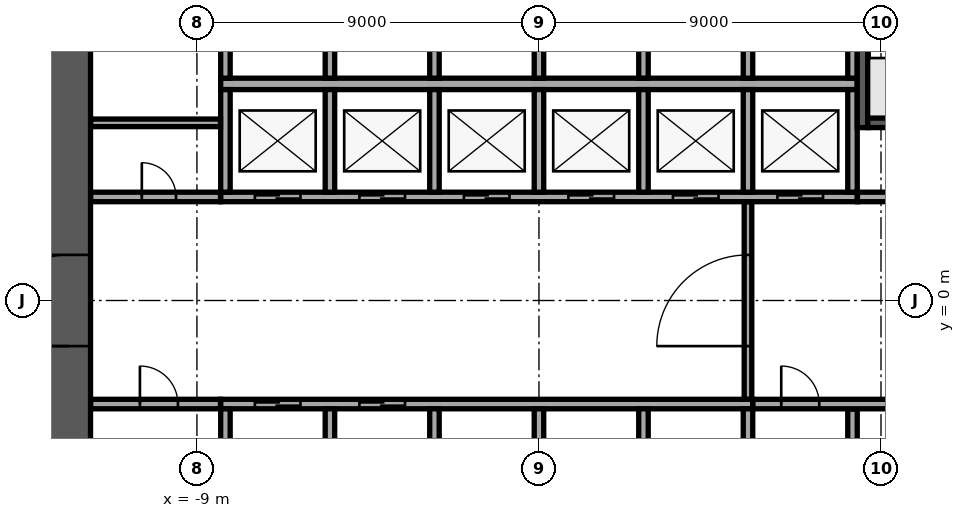
"""IFC4 building model, lengths in metres.
Left out: names, types, materials, properties, quantities, classifications, styles, units other than length and angle.
Written with IfcOpenShell. Run it as: python <this file> out.ifc"""

import sys

from ifc_helpers import new_model, si_unit, direction, frame, frame_2d, origin, place, context, subcontext, project, spatial, rectangle, extrude, element, fill, save


model = new_model("IFC4")
c1 = context("Model", 3, precision=1e-05, world=origin(), true_north=direction((0.0, 1.0)))
c2 = subcontext(c1, "Body", "Model", "MODEL_VIEW")
j1 = project(units=[si_unit("LENGTHUNIT", "METRE"), si_unit("PLANEANGLEUNIT", "RADIAN")], contexts=[c1])
p1 = place(None, origin())
s1 = spatial("IfcSite", under=j1, at=p1, CompositionType="ELEMENT")
p2 = place(p1, origin())
s2 = spatial("IfcBuilding", under=s1, at=p2, CompositionType="ELEMENT")
p3 = place(p2, frame((0.0, 0.0, 130.1)))
s3 = spatial("IfcBuildingStorey", under=s2, at=p3, CompositionType="ELEMENT", Elevation=130.1)
p4 = place(p3, frame((-12.35, -11.8, 0.0), z_axis=(0.0, 0.0, 1.0), x_axis=(0.0, 1.0, 0.0)))
e1 = element("IfcWall", 1, at=p4, inside=s3, PredefinedType="SHEAR", context=c2, shape_type="SweptSolid", body=[
    extrude(rectangle(XDim=23.6, YDim=1.1, at=frame_2d((11.8, 0.0))), origin(), (0.0, 0.0, 1.0), 5.2),
])
p5 = place(p4, frame((10.6, 0.0, 0.0)))
e2 = element("IfcOpeningElement", 2, at=p5, cuts=e1, PredefinedType="OPENING", context=c2, shape_type="SweptSolid", body=[
    extrude(rectangle(XDim=2.4, YDim=2.4, at=frame_2d((1.2, 1.2))), frame((0.0, 0.56, 0.0), z_axis=(0.0, -1.0, 0.0), x_axis=(1.0, 0.0, 0.0)), (0.0, 0.0, 1.0), 1.12),
])
p6 = place(p3, frame((-8.375, 5.7, 0.0), z_axis=(0.0, 0.0, 1.0), x_axis=(1.0, 0.0, 0.0)))
e3 = element("IfcWall", 3, at=p6, inside=s3, PredefinedType="SOLIDWALL", context=c2, shape_type="SweptSolid", body=[
    extrude(rectangle(XDim=16.75, YDim=0.3, at=frame_2d((8.375, 0.0))), origin(), (0.0, 0.0, 1.0), 5.2),
])
p7 = place(p3, frame((-8.375, 2.725, 0.0), z_axis=(0.0, 0.0, 1.0), x_axis=(1.0, 0.0, 0.0)))
e4 = element("IfcWall", 4, at=p7, inside=s3, PredefinedType="SOLIDWALL", context=c2, shape_type="SweptSolid", body=[
    extrude(rectangle(XDim=16.75, YDim=0.25, at=frame_2d((8.375, 0.0))), origin(), (0.0, 0.0, 1.0), 5.2),
])
p8 = place(p7, frame((0.9, 0.0, 0.0)))
e5 = element("IfcOpeningElement", 5, at=p8, cuts=e4, PredefinedType="OPENING", context=c2, shape_type="SweptSolid", body=[
    extrude(rectangle(XDim=1.2, YDim=2.1, at=frame_2d((0.6, 1.05))), frame((0.0, 0.135, 0.0), z_axis=(0.0, -1.0, 0.0), x_axis=(1.0, 0.0, 0.0)), (0.0, 0.0, 1.0), 0.27),
])
p9 = place(p7, frame((3.65, 0.0, 0.0)))
e6 = element("IfcOpeningElement", 6, at=p9, cuts=e4, PredefinedType="OPENING", context=c2, shape_type="SweptSolid", body=[
    extrude(rectangle(XDim=1.2, YDim=2.1, at=frame_2d((0.6, 1.05))), frame((0.0, 0.135, 0.0), z_axis=(0.0, -1.0, 0.0), x_axis=(1.0, 0.0, 0.0)), (0.0, 0.0, 1.0), 0.27),
])
p10 = place(p7, frame((6.4, 0.0, 0.0)))
e7 = element("IfcOpeningElement", 7, at=p10, cuts=e4, PredefinedType="OPENING", context=c2, shape_type="SweptSolid", body=[
    extrude(rectangle(XDim=1.2, YDim=2.1, at=frame_2d((0.6, 1.05))), frame((0.0, 0.135, 0.0), z_axis=(0.0, -1.0, 0.0), x_axis=(1.0, 0.0, 0.0)), (0.0, 0.0, 1.0), 0.27),
])
p11 = place(p7, frame((9.15, 0.0, 0.0)))
e8 = element("IfcOpeningElement", 8, at=p11, cuts=e4, PredefinedType="OPENING", context=c2, shape_type="SweptSolid", body=[
    extrude(rectangle(XDim=1.2, YDim=2.1, at=frame_2d((0.6, 1.05))), frame((0.0, 0.135, 0.0), z_axis=(0.0, -1.0, 0.0), x_axis=(1.0, 0.0, 0.0)), (0.0, 0.0, 1.0), 0.27),
])
p12 = place(p7, frame((11.9, 0.0, 0.0)))
e9 = element("IfcOpeningElement", 9, at=p12, cuts=e4, PredefinedType="OPENING", context=c2, shape_type="SweptSolid", body=[
    extrude(rectangle(XDim=1.2, YDim=2.1, at=frame_2d((0.6, 1.05))), frame((0.0, 0.135, 0.0), z_axis=(0.0, -1.0, 0.0), x_axis=(1.0, 0.0, 0.0)), (0.0, 0.0, 1.0), 0.27),
])
p13 = place(p7, frame((14.65, 0.0, 0.0)))
e10 = element("IfcOpeningElement", 10, at=p13, cuts=e4, PredefinedType="OPENING", context=c2, shape_type="SweptSolid", body=[
    extrude(rectangle(XDim=1.2, YDim=2.1, at=frame_2d((0.6, 1.05))), frame((0.0, 0.135, 0.0), z_axis=(0.0, -1.0, 0.0), x_axis=(1.0, 0.0, 0.0)), (0.0, 0.0, 1.0), 0.27),
])
for number, where, z_axis, x_axis in (
    (11, (-8.25, 2.85, 0.0), (0.0, 0.0, 1.0), (0.0, 1.0, 0.0)),
    (12, (-5.5, 2.85, 0.0), (0.0, 0.0, 1.0), (0.0, 1.0, 0.0)),
    (13, (-2.75, 2.85, 0.0), (0.0, 0.0, 1.0), (0.0, 1.0, 0.0)),
    (14, (0.0, 2.85, 0.0), (0.0, 0.0, 1.0), (0.0, 1.0, 0.0)),
    (15, (2.75, 2.85, 0.0), (0.0, 0.0, 1.0), (0.0, 1.0, 0.0)),
    (16, (5.5, 2.85, 0.0), (0.0, 0.0, 1.0), (0.0, 1.0, 0.0)),
    (17, (8.25, 2.85, 0.0), (0.0, 0.0, 1.0), (0.0, 1.0, 0.0)),
    (18, (-8.25, 5.85, 0.0), (0.0, 0.0, 1.0), (0.0, 1.0, 0.0)),
    (19, (-5.5, 5.85, 0.0), (0.0, 0.0, 1.0), (0.0, 1.0, 0.0)),
    (20, (-2.75, 5.85, 0.0), (0.0, 0.0, 1.0), (0.0, 1.0, 0.0)),
    (21, (0.0, 5.85, 0.0), (0.0, 0.0, 1.0), (0.0, 1.0, 0.0)),
    (22, (2.75, 5.85, 0.0), (0.0, 0.0, 1.0), (0.0, 1.0, 0.0)),
    (23, (5.5, 5.85, 0.0), (0.0, 0.0, 1.0), (0.0, 1.0, 0.0)),
    (24, (8.25, 5.85, 0.0), (0.0, 0.0, 1.0), (0.0, 1.0, 0.0)),
):
    element("IfcWall", number, at=place(p3, frame(where, z_axis=z_axis, x_axis=x_axis)), inside=s3, PredefinedType="SOLIDWALL", context=c2, shape_type="SweptSolid", body=[
        extrude(rectangle(XDim=2.7, YDim=0.25, at=frame_2d((1.35, 0.0))), origin(), (0.0, 0.0, 1.0), 5.2),
    ])
p14 = place(p3, frame((-8.375, -2.725, 0.0), z_axis=(0.0, 0.0, 1.0), x_axis=(1.0, 0.0, 0.0)))
e25 = element("IfcWall", 25, at=p14, inside=s3, PredefinedType="SOLIDWALL", context=c2, shape_type="SweptSolid", body=[
    extrude(rectangle(XDim=14.0, YDim=0.25, at=frame_2d((7.0, 0.0))), origin(), (0.0, 0.0, 1.0), 5.2),
])
p15 = place(p14, frame((0.9, 0.0, 0.0)))
e26 = element("IfcOpeningElement", 26, at=p15, cuts=e25, PredefinedType="OPENING", context=c2, shape_type="SweptSolid", body=[
    extrude(rectangle(XDim=1.2, YDim=2.1, at=frame_2d((0.6, 1.05))), frame((0.0, 0.135, 0.0), z_axis=(0.0, -1.0, 0.0), x_axis=(1.0, 0.0, 0.0)), (0.0, 0.0, 1.0), 0.27),
])
p16 = place(p14, frame((3.65, 0.0, 0.0)))
e27 = element("IfcOpeningElement", 27, at=p16, cuts=e25, PredefinedType="OPENING", context=c2, shape_type="SweptSolid", body=[
    extrude(rectangle(XDim=1.2, YDim=2.1, at=frame_2d((0.6, 1.05))), frame((0.0, 0.135, 0.0), z_axis=(0.0, -1.0, 0.0), x_axis=(1.0, 0.0, 0.0)), (0.0, 0.0, 1.0), 0.27),
])
for number, where, z_axis, x_axis in (
    (28, (-8.25, -5.55, 0.0), (0.0, 0.0, 1.0), (0.0, 1.0, 0.0)),
    (29, (-5.5, -5.55, 0.0), (0.0, 0.0, 1.0), (0.0, 1.0, 0.0)),
    (30, (-2.75, -5.55, 0.0), (0.0, 0.0, 1.0), (0.0, 1.0, 0.0)),
    (31, (0.0, -5.55, 0.0), (0.0, 0.0, 1.0), (0.0, 1.0, 0.0)),
    (32, (2.75, -5.55, 0.0), (0.0, 0.0, 1.0), (0.0, 1.0, 0.0)),
    (33, (5.5, -5.55, 0.0), (0.0, 0.0, 1.0), (0.0, 1.0, 0.0)),
):
    element("IfcWall", number, at=place(p3, frame(where, z_axis=z_axis, x_axis=x_axis)), inside=s3, PredefinedType="SOLIDWALL", context=c2, shape_type="SweptSolid", body=[
        extrude(rectangle(XDim=2.7, YDim=0.25, at=frame_2d((1.35, 0.0))), origin(), (0.0, 0.0, 1.0), 5.2),
    ])
p17 = place(p3, frame((8.512, 4.55, 0.0), z_axis=(0.0, 0.0, 1.0), x_axis=(0.0, 1.0, 0.0)))
e34 = element("IfcWall", 34, at=p17, inside=s3, PredefinedType="SOLIDWALL", context=c2, shape_type="SweptSolid", body=[
    extrude(rectangle(XDim=7.25, YDim=0.275, at=frame_2d((3.625, 0.0))), origin(), (0.0, 0.0, 1.0), 5.2),
])
p18 = place(p17, frame((6.0, 0.0, 0.0)))
e35 = element("IfcOpeningElement", 35, at=p18, cuts=e34, PredefinedType="OPENING", context=c2, shape_type="SweptSolid", body=[
    extrude(rectangle(XDim=1.0, YDim=2.1, at=frame_2d((0.5, 1.05))), frame((0.0, 0.147, 0.0), z_axis=(0.0, -1.0, 0.0), x_axis=(1.0, 0.0, 0.0)), (0.0, 0.0, 1.0), 0.295),
])
p19 = place(p3, frame((8.65, 4.675, 0.0), z_axis=(0.0, 0.0, 1.0), x_axis=(1.0, 0.0, 0.0)))
e36 = element("IfcWall", 36, at=p19, inside=s3, PredefinedType="SOLIDWALL", context=c2, shape_type="SweptSolid", body=[
    extrude(rectangle(XDim=3.15, YDim=0.25, at=frame_2d((1.575, 0.0))), origin(), (0.0, 0.0, 1.0), 5.2),
])
p20 = place(p3, frame((8.25, -5.545, 0.0), z_axis=(0.0, 0.0, 1.0), x_axis=(0.0, 1.0, 0.0)))
e37 = element("IfcWall", 37, at=p20, inside=s3, PredefinedType="PARTITIONING", context=c2, shape_type="SweptSolid", body=[
    extrude(rectangle(XDim=2.69, YDim=0.25, at=frame_2d((1.345, 0.0))), origin(), (0.0, 0.0, 1.0), 5.2),
])
p21 = place(p3, frame((-11.795, -2.725, 0.0), z_axis=(0.0, 0.0, 1.0), x_axis=(1.0, 0.0, 0.0)))
e38 = element("IfcWall", 38, at=p21, inside=s3, PredefinedType="PARTITIONING", context=c2, shape_type="SweptSolid", body=[
    extrude(rectangle(XDim=3.415, YDim=0.25, at=frame_2d((1.708, 0.0))), origin(), (0.0, 0.0, 1.0), 5.2),
])
p22 = place(p21, frame((1.295, 0.0, 0.0)))
e39 = element("IfcOpeningElement", 39, at=p22, cuts=e38, PredefinedType="OPENING", context=c2, shape_type="SweptSolid", body=[
    extrude(rectangle(XDim=1.0, YDim=2.1, at=frame_2d((0.5, 1.05))), frame((0.0, 0.135, 0.0), z_axis=(0.0, -1.0, 0.0), x_axis=(1.0, 0.0, 0.0)), (0.0, 0.0, 1.0), 0.27),
])
p23 = place(p3, frame((5.63, -2.725, 0.0), z_axis=(0.0, 0.0, 1.0), x_axis=(1.0, 0.0, 0.0)))
e40 = element("IfcWall", 40, at=p23, inside=s3, PredefinedType="PARTITIONING", context=c2, shape_type="SweptSolid", body=[
    extrude(rectangle(XDim=6.165, YDim=0.25, at=frame_2d((3.083, 0.0))), origin(), (0.0, 0.0, 1.0), 5.2),
])
p24 = place(p23, frame((0.745, 0.0, 0.0)))
e41 = element("IfcOpeningElement", 41, at=p24, cuts=e40, PredefinedType="OPENING", context=c2, shape_type="SweptSolid", body=[
    extrude(rectangle(XDim=1.0, YDim=2.1, at=frame_2d((0.5, 1.05))), frame((0.0, 0.135, 0.0), z_axis=(0.0, -1.0, 0.0), x_axis=(1.0, 0.0, 0.0)), (0.0, 0.0, 1.0), 0.27),
])
p25 = place(p23, frame((3.92, 0.0, 0.0)))
e42 = element("IfcOpeningElement", 42, at=p25, cuts=e40, PredefinedType="OPENING", context=c2, shape_type="SweptSolid", body=[
    extrude(rectangle(XDim=0.9, YDim=2.1, at=frame_2d((0.45, 1.05))), frame((0.0, 0.135, 0.0), z_axis=(0.0, -1.0, 0.0), x_axis=(1.0, 0.0, 0.0)), (0.0, 0.0, 1.0), 0.27),
])
p26 = place(p3, frame((5.5, -2.595, 0.0), z_axis=(0.0, 0.0, 1.0), x_axis=(0.0, 1.0, 0.0)))
e43 = element("IfcWall", 43, at=p26, inside=s3, PredefinedType="PARTITIONING", context=c2, shape_type="SweptSolid", body=[
    extrude(rectangle(XDim=5.19, YDim=0.2, at=frame_2d((2.595, 0.0))), origin(), (0.0, 0.0, 1.0), 5.2),
])
p27 = place(p26, frame((1.395, 0.0, 0.0)))
e44 = element("IfcOpeningElement", 44, at=p27, cuts=e43, PredefinedType="OPENING", context=c2, shape_type="SweptSolid", body=[
    extrude(rectangle(XDim=2.4, YDim=2.4, at=frame_2d((1.2, 1.2))), frame((0.0, 0.11, 0.0), z_axis=(0.0, -1.0, 0.0), x_axis=(1.0, 0.0, 0.0)), (0.0, 0.0, 1.0), 0.22),
])
p28 = place(p3, frame((-11.795, 2.725, 0.0), z_axis=(0.0, 0.0, 1.0), x_axis=(1.0, 0.0, 0.0)))
e45 = element("IfcWall", 45, at=p28, inside=s3, PredefinedType="PARTITIONING", context=c2, shape_type="SweptSolid", body=[
    extrude(rectangle(XDim=3.415, YDim=0.25, at=frame_2d((1.708, 0.0))), origin(), (0.0, 0.0, 1.0), 5.2),
])
p29 = place(p28, frame((1.345, 0.0, 0.0)))
e46 = element("IfcOpeningElement", 46, at=p29, cuts=e45, PredefinedType="OPENING", context=c2, shape_type="SweptSolid", body=[
    extrude(rectangle(XDim=0.9, YDim=2.1, at=frame_2d((0.45, 1.05))), frame((0.0, 0.135, 0.0), z_axis=(0.0, -1.0, 0.0), x_axis=(1.0, 0.0, 0.0)), (0.0, 0.0, 1.0), 0.27),
])
p30 = place(p3, frame((8.38, 2.725, 0.0), z_axis=(0.0, 0.0, 1.0), x_axis=(1.0, 0.0, 0.0)))
e47 = element("IfcWall", 47, at=p30, inside=s3, PredefinedType="PARTITIONING", context=c2, shape_type="SweptSolid", body=[
    extrude(rectangle(XDim=3.415, YDim=0.25, at=frame_2d((1.708, 0.0))), origin(), (0.0, 0.0, 1.0), 5.2),
])
p31 = place(p30, frame((1.17, 0.0, 0.0)))
e48 = element("IfcOpeningElement", 48, at=p31, cuts=e47, PredefinedType="OPENING", context=c2, shape_type="SweptSolid", body=[
    extrude(rectangle(XDim=0.9, YDim=2.1, at=frame_2d((0.45, 1.05))), frame((0.0, 0.135, 0.0), z_axis=(0.0, -1.0, 0.0), x_axis=(1.0, 0.0, 0.0)), (0.0, 0.0, 1.0), 0.27),
])
p32 = place(p3, frame((-11.795, 4.675, 0.0), z_axis=(0.0, 0.0, 1.0), x_axis=(1.0, 0.0, 0.0)))
e49 = element("IfcWall", 49, at=p32, inside=s3, PredefinedType="PARTITIONING", context=c2, shape_type="SweptSolid", body=[
    extrude(rectangle(XDim=3.415, YDim=0.2, at=frame_2d((1.708, 0.0))), origin(), (0.0, 0.0, 1.0), 5.2),
])
p33 = place(p5, origin())
e50 = element("IfcDoor", 50, at=p33, inside=s3, OperationType="SINGLE_SWING_LEFT", PredefinedType="DOOR", context=c2, shape_type="SweptSolid", body=[
    extrude(rectangle(XDim=2.4, YDim=2.4, at=frame_2d((1.2, 1.2))), frame((0.0, 0.025, 0.0), z_axis=(0.0, -1.0, 0.0), x_axis=(1.0, 0.0, 0.0)), (0.0, 0.0, 1.0), 0.05),
])
fill(e2, e50)
p34 = place(p8, origin())
e51 = element("IfcDoor", 51, at=p34, inside=s3, OperationType="DOUBLE_DOOR_SLIDING", PredefinedType="DOOR", context=c2, shape_type="SweptSolid", body=[
    extrude(rectangle(XDim=1.2, YDim=2.1, at=frame_2d((0.6, 1.05))), frame((0.0, 0.025, 0.0), z_axis=(0.0, -1.0, 0.0), x_axis=(1.0, 0.0, 0.0)), (0.0, 0.0, 1.0), 0.05),
])
fill(e5, e51)
p35 = place(p9, origin())
e52 = element("IfcDoor", 52, at=p35, inside=s3, OperationType="DOUBLE_DOOR_SLIDING", PredefinedType="DOOR", context=c2, shape_type="SweptSolid", body=[
    extrude(rectangle(XDim=1.2, YDim=2.1, at=frame_2d((0.6, 1.05))), frame((0.0, 0.025, 0.0), z_axis=(0.0, -1.0, 0.0), x_axis=(1.0, 0.0, 0.0)), (0.0, 0.0, 1.0), 0.05),
])
fill(e6, e52)
p36 = place(p10, origin())
e53 = element("IfcDoor", 53, at=p36, inside=s3, OperationType="DOUBLE_DOOR_SLIDING", PredefinedType="DOOR", context=c2, shape_type="SweptSolid", body=[
    extrude(rectangle(XDim=1.2, YDim=2.1, at=frame_2d((0.6, 1.05))), frame((0.0, 0.025, 0.0), z_axis=(0.0, -1.0, 0.0), x_axis=(1.0, 0.0, 0.0)), (0.0, 0.0, 1.0), 0.05),
])
fill(e7, e53)
p37 = place(p11, origin())
e54 = element("IfcDoor", 54, at=p37, inside=s3, OperationType="DOUBLE_DOOR_SLIDING", PredefinedType="DOOR", context=c2, shape_type="SweptSolid", body=[
    extrude(rectangle(XDim=1.2, YDim=2.1, at=frame_2d((0.6, 1.05))), frame((0.0, 0.025, 0.0), z_axis=(0.0, -1.0, 0.0), x_axis=(1.0, 0.0, 0.0)), (0.0, 0.0, 1.0), 0.05),
])
fill(e8, e54)
p38 = place(p12, origin())
e55 = element("IfcDoor", 55, at=p38, inside=s3, OperationType="DOUBLE_DOOR_SLIDING", PredefinedType="DOOR", context=c2, shape_type="SweptSolid", body=[
    extrude(rectangle(XDim=1.2, YDim=2.1, at=frame_2d((0.6, 1.05))), frame((0.0, 0.025, 0.0), z_axis=(0.0, -1.0, 0.0), x_axis=(1.0, 0.0, 0.0)), (0.0, 0.0, 1.0), 0.05),
])
fill(e9, e55)
p39 = place(p13, origin())
e56 = element("IfcDoor", 56, at=p39, inside=s3, OperationType="DOUBLE_DOOR_SLIDING", PredefinedType="DOOR", context=c2, shape_type="SweptSolid", body=[
    extrude(rectangle(XDim=1.2, YDim=2.1, at=frame_2d((0.6, 1.05))), frame((0.0, 0.025, 0.0), z_axis=(0.0, -1.0, 0.0), x_axis=(1.0, 0.0, 0.0)), (0.0, 0.0, 1.0), 0.05),
])
fill(e10, e56)
p40 = place(p15, origin())
e57 = element("IfcDoor", 57, at=p40, inside=s3, OperationType="DOUBLE_DOOR_SLIDING", PredefinedType="DOOR", context=c2, shape_type="SweptSolid", body=[
    extrude(rectangle(XDim=1.2, YDim=2.1, at=frame_2d((0.6, 1.05))), frame((0.0, 0.025, 0.0), z_axis=(0.0, -1.0, 0.0), x_axis=(1.0, 0.0, 0.0)), (0.0, 0.0, 1.0), 0.05),
])
fill(e26, e57)
p41 = place(p16, origin())
e58 = element("IfcDoor", 58, at=p41, inside=s3, OperationType="DOUBLE_DOOR_SLIDING", PredefinedType="DOOR", context=c2, shape_type="SweptSolid", body=[
    extrude(rectangle(XDim=1.2, YDim=2.1, at=frame_2d((0.6, 1.05))), frame((0.0, 0.025, 0.0), z_axis=(0.0, -1.0, 0.0), x_axis=(1.0, 0.0, 0.0)), (0.0, 0.0, 1.0), 0.05),
])
fill(e27, e58)
p42 = place(p22, origin())
e59 = element("IfcDoor", 59, at=p42, inside=s3, OperationType="SINGLE_SWING_LEFT", PredefinedType="DOOR", context=c2, shape_type="SweptSolid", body=[
    extrude(rectangle(XDim=1.0, YDim=2.1, at=frame_2d((0.5, 1.05))), frame((0.0, 0.025, 0.0), z_axis=(0.0, -1.0, 0.0), x_axis=(1.0, 0.0, 0.0)), (0.0, 0.0, 1.0), 0.05),
])
fill(e39, e59)
p43 = place(p24, origin())
e60 = element("IfcDoor", 60, at=p43, inside=s3, OperationType="SINGLE_SWING_LEFT", PredefinedType="DOOR", context=c2, shape_type="SweptSolid", body=[
    extrude(rectangle(XDim=1.0, YDim=2.1, at=frame_2d((0.5, 1.05))), frame((0.0, 0.025, 0.0), z_axis=(0.0, -1.0, 0.0), x_axis=(1.0, 0.0, 0.0)), (0.0, 0.0, 1.0), 0.05),
])
fill(e41, e60)
p44 = place(p29, origin())
e61 = element("IfcDoor", 61, at=p44, inside=s3, OperationType="SINGLE_SWING_LEFT", PredefinedType="DOOR", context=c2, shape_type="SweptSolid", body=[
    extrude(rectangle(XDim=0.9, YDim=2.1, at=frame_2d((0.45, 1.05))), frame((0.0, 0.025, 0.0), z_axis=(0.0, -1.0, 0.0), x_axis=(1.0, 0.0, 0.0)), (0.0, 0.0, 1.0), 0.05),
])
fill(e46, e61)
p45 = place(p27, origin())
e62 = element("IfcDoor", 62, at=p45, inside=s3, OperationType="SINGLE_SWING_LEFT", PredefinedType="DOOR", context=c2, shape_type="SweptSolid", body=[
    extrude(rectangle(XDim=2.4, YDim=2.4, at=frame_2d((1.2, 1.2))), frame((0.0, 0.025, 0.0), z_axis=(0.0, -1.0, 0.0), x_axis=(1.0, 0.0, 0.0)), (0.0, 0.0, 1.0), 0.05),
])
fill(e44, e62)
save(model, sys.argv[1])
